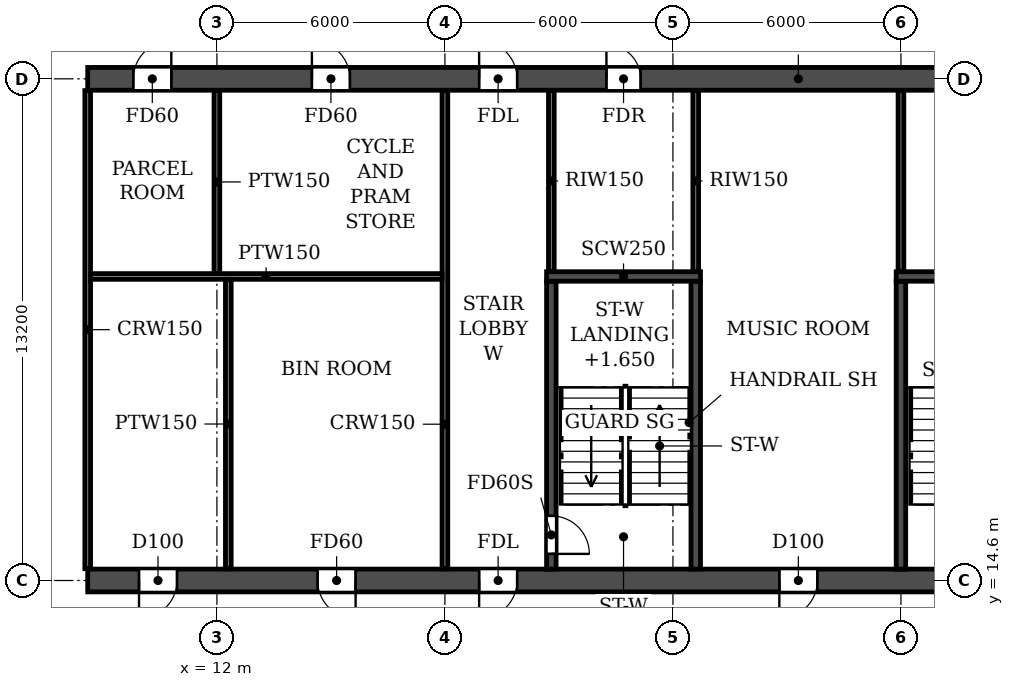
"""IFC4 building model, lengths in metres.
Left out: names, types, materials, properties, quantities, classifications, styles, units other than length and angle.
Written with IfcOpenShell. Run it as: python <this file> out.ifc"""

import sys

from ifc_helpers import new_model, si_unit, direction, frame, frame_2d, origin, place, context, subcontext, project, spatial, rectangle, extrude, element, fill, save


model = new_model("IFC4")
c1 = context("Model", 3, precision=1e-05, world=origin(), true_north=direction((0.0, 1.0)))
c2 = subcontext(c1, "Body", "Model", "MODEL_VIEW")
j1 = project(units=[si_unit("LENGTHUNIT", "METRE"), si_unit("PLANEANGLEUNIT", "RADIAN")], contexts=[c1])
p1 = place(None, origin())
s1 = spatial("IfcSite", under=j1, at=p1, CompositionType="ELEMENT")
p2 = place(p1, origin())
s2 = spatial("IfcBuilding", under=s1, at=p2, CompositionType="ELEMENT")
p3 = place(p2, frame((0.0, 0.0, 63.0)))
s3 = spatial("IfcBuildingStorey", under=s2, at=p3, CompositionType="ELEMENT", Elevation=63.0)
p4 = place(p3, frame((8.6, 14.6, 0.0), z_axis=(0.0, 0.0, 1.0), x_axis=(1.0, 0.0, 0.0)))
e1 = element("IfcWall", 1, at=p4, inside=s3, PredefinedType="SOLIDWALL", context=c2, shape_type="SweptSolid", body=[
    extrude(rectangle(XDim=84.8, YDim=0.6, at=frame_2d((42.4, 0.0))), origin(), (0.0, 0.0, 1.0), 2.95),
])
p5 = place(p4, frame((1.35, 0.0, 0.0)))
e2 = element("IfcOpeningElement", 2, at=p5, cuts=e1, PredefinedType="OPENING", context=c2, shape_type="SweptSolid", body=[
    extrude(rectangle(XDim=1.0, YDim=2.1, at=frame_2d((0.5, 1.05))), frame((0.0, 0.31, 0.0), z_axis=(0.0, -1.0, 0.0), x_axis=(1.0, 0.0, 0.0)), (0.0, 0.0, 1.0), 0.62),
])
p6 = place(p4, frame((6.05, 0.0, 0.0)))
e3 = element("IfcOpeningElement", 3, at=p6, cuts=e1, PredefinedType="OPENING", context=c2, shape_type="SweptSolid", body=[
    extrude(rectangle(XDim=1.0, YDim=2.1, at=frame_2d((0.5, 1.05))), frame((0.0, 0.31, 0.0), z_axis=(0.0, -1.0, 0.0), x_axis=(1.0, 0.0, 0.0)), (0.0, 0.0, 1.0), 0.62),
])
p7 = place(p4, frame((10.3, 0.0, 0.0)))
e4 = element("IfcOpeningElement", 4, at=p7, cuts=e1, PredefinedType="OPENING", context=c2, shape_type="SweptSolid", body=[
    extrude(rectangle(XDim=1.0, YDim=2.1, at=frame_2d((0.5, 1.05))), frame((0.0, 0.31, 0.0), z_axis=(0.0, -1.0, 0.0), x_axis=(1.0, 0.0, 0.0)), (0.0, 0.0, 1.0), 0.62),
])
p8 = place(p4, frame((18.2, 0.0, 0.0)))
e5 = element("IfcOpeningElement", 5, at=p8, cuts=e1, PredefinedType="OPENING", context=c2, shape_type="SweptSolid", body=[
    extrude(rectangle(XDim=1.0, YDim=2.1, at=frame_2d((0.5, 1.05))), frame((0.0, 0.31, 0.0), z_axis=(0.0, -1.0, 0.0), x_axis=(1.0, 0.0, 0.0)), (0.0, 0.0, 1.0), 0.62),
])
p9 = place(p4, frame((22.8, 0.0, 0.0)))
e6 = element("IfcOpeningElement", 6, at=p9, cuts=e1, PredefinedType="OPENING", context=c2, shape_type="SweptSolid", body=[
    extrude(rectangle(XDim=1.0, YDim=2.1, at=frame_2d((0.5, 1.05))), frame((0.0, 0.31, 0.0), z_axis=(0.0, -1.0, 0.0), x_axis=(1.0, 0.0, 0.0)), (0.0, 0.0, 1.0), 0.62),
])
p10 = place(p4, frame((35.4, 0.0, 0.0)))
e7 = element("IfcOpeningElement", 7, at=p10, cuts=e1, PredefinedType="OPENING", context=c2, shape_type="SweptSolid", body=[
    extrude(rectangle(XDim=1.0, YDim=2.1, at=frame_2d((0.5, 1.05))), frame((0.0, 0.31, 0.0), z_axis=(0.0, -1.0, 0.0), x_axis=(1.0, 0.0, 0.0)), (0.0, 0.0, 1.0), 0.62),
])
p11 = place(p4, frame((39.3, 0.0, 0.0)))
e8 = element("IfcOpeningElement", 8, at=p11, cuts=e1, PredefinedType="OPENING", context=c2, shape_type="SweptSolid", body=[
    extrude(rectangle(XDim=1.0, YDim=2.1, at=frame_2d((0.5, 1.05))), frame((0.0, 0.31, 0.0), z_axis=(0.0, -1.0, 0.0), x_axis=(1.0, 0.0, 0.0)), (0.0, 0.0, 1.0), 0.62),
])
p12 = place(p4, frame((41.9, 0.0, 0.0)))
e9 = element("IfcOpeningElement", 9, at=p12, cuts=e1, PredefinedType="OPENING", context=c2, shape_type="SweptSolid", body=[
    extrude(rectangle(XDim=1.0, YDim=2.1, at=frame_2d((0.5, 1.05))), frame((0.0, 0.31, 0.0), z_axis=(0.0, -1.0, 0.0), x_axis=(1.0, 0.0, 0.0)), (0.0, 0.0, 1.0), 0.62),
])
p13 = place(p4, frame((47.1, 0.0, 0.0)))
e10 = element("IfcOpeningElement", 10, at=p13, cuts=e1, PredefinedType="OPENING", context=c2, shape_type="SweptSolid", body=[
    extrude(rectangle(XDim=1.0, YDim=2.1, at=frame_2d((0.5, 1.05))), frame((0.0, 0.31, 0.0), z_axis=(0.0, -1.0, 0.0), x_axis=(1.0, 0.0, 0.0)), (0.0, 0.0, 1.0), 0.62),
])
p14 = place(p4, frame((61.0, 0.0, 0.0)))
e11 = element("IfcOpeningElement", 11, at=p14, cuts=e1, PredefinedType="OPENING", context=c2, shape_type="SweptSolid", body=[
    extrude(rectangle(XDim=1.0, YDim=2.1, at=frame_2d((0.5, 1.05))), frame((0.0, 0.31, 0.0), z_axis=(0.0, -1.0, 0.0), x_axis=(1.0, 0.0, 0.0)), (0.0, 0.0, 1.0), 0.62),
])
p15 = place(p4, frame((65.6, 0.0, 0.0)))
e12 = element("IfcOpeningElement", 12, at=p15, cuts=e1, PredefinedType="OPENING", context=c2, shape_type="SweptSolid", body=[
    extrude(rectangle(XDim=1.0, YDim=2.1, at=frame_2d((0.5, 1.05))), frame((0.0, 0.31, 0.0), z_axis=(0.0, -1.0, 0.0), x_axis=(1.0, 0.0, 0.0)), (0.0, 0.0, 1.0), 0.62),
])
p16 = place(p4, frame((73.5, 0.0, 0.0)))
e13 = element("IfcOpeningElement", 13, at=p16, cuts=e1, PredefinedType="OPENING", context=c2, shape_type="SweptSolid", body=[
    extrude(rectangle(XDim=1.0, YDim=2.1, at=frame_2d((0.5, 1.05))), frame((0.0, 0.31, 0.0), z_axis=(0.0, -1.0, 0.0), x_axis=(1.0, 0.0, 0.0)), (0.0, 0.0, 1.0), 0.62),
])
p17 = place(p4, frame((77.9, 0.0, 0.0)))
e14 = element("IfcOpeningElement", 14, at=p17, cuts=e1, PredefinedType="OPENING", context=c2, shape_type="SweptSolid", body=[
    extrude(rectangle(XDim=1.0, YDim=2.1, at=frame_2d((0.5, 1.05))), frame((0.0, 0.31, 0.0), z_axis=(0.0, -1.0, 0.0), x_axis=(1.0, 0.0, 0.0)), (0.0, 0.0, 1.0), 0.62),
])
p18 = place(p4, frame((82.6, 0.0, 0.0)))
e15 = element("IfcOpeningElement", 15, at=p18, cuts=e1, PredefinedType="OPENING", context=c2, shape_type="SweptSolid", body=[
    extrude(rectangle(XDim=1.0, YDim=2.1, at=frame_2d((0.5, 1.05))), frame((0.0, 0.31, 0.0), z_axis=(0.0, -1.0, 0.0), x_axis=(1.0, 0.0, 0.0)), (0.0, 0.0, 1.0), 0.62),
])
p19 = place(p3, frame((8.6, 27.8, 0.0), z_axis=(0.0, 0.0, 1.0), x_axis=(1.0, 0.0, 0.0)))
e16 = element("IfcWall", 16, at=p19, inside=s3, PredefinedType="SOLIDWALL", context=c2, shape_type="SweptSolid", body=[
    extrude(rectangle(XDim=84.8, YDim=0.6, at=frame_2d((42.4, 0.0))), origin(), (0.0, 0.0, 1.0), 2.95),
])
p20 = place(p19, frame((1.2, 0.0, 0.0)))
e17 = element("IfcOpeningElement", 17, at=p20, cuts=e16, PredefinedType="OPENING", context=c2, shape_type="SweptSolid", body=[
    extrude(rectangle(XDim=1.0, YDim=2.1, at=frame_2d((0.5, 1.05))), frame((0.0, 0.31, 0.0), z_axis=(0.0, -1.0, 0.0), x_axis=(1.0, 0.0, 0.0)), (0.0, 0.0, 1.0), 0.62),
])
p21 = place(p19, frame((5.9, 0.0, 0.0)))
e18 = element("IfcOpeningElement", 18, at=p21, cuts=e16, PredefinedType="OPENING", context=c2, shape_type="SweptSolid", body=[
    extrude(rectangle(XDim=1.0, YDim=2.1, at=frame_2d((0.5, 1.05))), frame((0.0, 0.31, 0.0), z_axis=(0.0, -1.0, 0.0), x_axis=(1.0, 0.0, 0.0)), (0.0, 0.0, 1.0), 0.62),
])
p22 = place(p19, frame((10.3, 0.0, 0.0)))
e19 = element("IfcOpeningElement", 19, at=p22, cuts=e16, PredefinedType="OPENING", context=c2, shape_type="SweptSolid", body=[
    extrude(rectangle(XDim=1.0, YDim=2.1, at=frame_2d((0.5, 1.05))), frame((0.0, 0.31, 0.0), z_axis=(0.0, -1.0, 0.0), x_axis=(1.0, 0.0, 0.0)), (0.0, 0.0, 1.0), 0.62),
])
p23 = place(p19, frame((13.65, 0.0, 0.0)))
e20 = element("IfcOpeningElement", 20, at=p23, cuts=e16, PredefinedType="OPENING", context=c2, shape_type="SweptSolid", body=[
    extrude(rectangle(XDim=0.9, YDim=2.1, at=frame_2d((0.45, 1.05))), frame((0.0, 0.31, 0.0), z_axis=(0.0, -1.0, 0.0), x_axis=(1.0, 0.0, 0.0)), (0.0, 0.0, 1.0), 0.62),
])
p24 = place(p19, frame((22.85, 0.0, 0.0)))
e21 = element("IfcOpeningElement", 21, at=p24, cuts=e16, PredefinedType="OPENING", context=c2, shape_type="SweptSolid", body=[
    extrude(rectangle(XDim=0.9, YDim=2.1, at=frame_2d((0.45, 1.05))), frame((0.0, 0.31, 0.0), z_axis=(0.0, -1.0, 0.0), x_axis=(1.0, 0.0, 0.0)), (0.0, 0.0, 1.0), 0.62),
])
p25 = place(p19, frame((27.3, 0.0, 0.0)))
e22 = element("IfcOpeningElement", 22, at=p25, cuts=e16, PredefinedType="OPENING", context=c2, shape_type="SweptSolid", body=[
    extrude(rectangle(XDim=1.0, YDim=2.1, at=frame_2d((0.5, 1.05))), frame((0.0, 0.31, 0.0), z_axis=(0.0, -1.0, 0.0), x_axis=(1.0, 0.0, 0.0)), (0.0, 0.0, 1.0), 0.62),
])
p26 = place(p19, frame((32.5, 0.0, 0.0)))
e23 = element("IfcOpeningElement", 23, at=p26, cuts=e16, PredefinedType="OPENING", context=c2, shape_type="SweptSolid", body=[
    extrude(rectangle(XDim=1.0, YDim=2.1, at=frame_2d((0.5, 1.05))), frame((0.0, 0.31, 0.0), z_axis=(0.0, -1.0, 0.0), x_axis=(1.0, 0.0, 0.0)), (0.0, 0.0, 1.0), 0.62),
])
p27 = place(p19, frame((39.0, 0.0, 0.0)))
e24 = element("IfcOpeningElement", 24, at=p27, cuts=e16, PredefinedType="OPENING", context=c2, shape_type="SweptSolid", body=[
    extrude(rectangle(XDim=1.0, YDim=2.1, at=frame_2d((0.5, 1.05))), frame((0.0, 0.31, 0.0), z_axis=(0.0, -1.0, 0.0), x_axis=(1.0, 0.0, 0.0)), (0.0, 0.0, 1.0), 0.62),
])
p28 = place(p19, frame((41.9, 0.0, 0.0)))
e25 = element("IfcOpeningElement", 25, at=p28, cuts=e16, PredefinedType="OPENING", context=c2, shape_type="SweptSolid", body=[
    extrude(rectangle(XDim=1.0, YDim=2.1, at=frame_2d((0.5, 1.05))), frame((0.0, 0.31, 0.0), z_axis=(0.0, -1.0, 0.0), x_axis=(1.0, 0.0, 0.0)), (0.0, 0.0, 1.0), 0.62),
])
p29 = place(p19, frame((47.4, 0.0, 0.0)))
e26 = element("IfcOpeningElement", 26, at=p29, cuts=e16, PredefinedType="OPENING", context=c2, shape_type="SweptSolid", body=[
    extrude(rectangle(XDim=1.0, YDim=2.1, at=frame_2d((0.5, 1.05))), frame((0.0, 0.31, 0.0), z_axis=(0.0, -1.0, 0.0), x_axis=(1.0, 0.0, 0.0)), (0.0, 0.0, 1.0), 0.62),
])
p30 = place(p19, frame((53.9, 0.0, 0.0)))
e27 = element("IfcOpeningElement", 27, at=p30, cuts=e16, PredefinedType="OPENING", context=c2, shape_type="SweptSolid", body=[
    extrude(rectangle(XDim=1.0, YDim=2.1, at=frame_2d((0.5, 1.05))), frame((0.0, 0.31, 0.0), z_axis=(0.0, -1.0, 0.0), x_axis=(1.0, 0.0, 0.0)), (0.0, 0.0, 1.0), 0.62),
])
p31 = place(p19, frame((57.8, 0.0, 0.0)))
e28 = element("IfcOpeningElement", 28, at=p31, cuts=e16, PredefinedType="OPENING", context=c2, shape_type="SweptSolid", body=[
    extrude(rectangle(XDim=1.0, YDim=2.1, at=frame_2d((0.5, 1.05))), frame((0.0, 0.31, 0.0), z_axis=(0.0, -1.0, 0.0), x_axis=(1.0, 0.0, 0.0)), (0.0, 0.0, 1.0), 0.62),
])
p32 = place(p19, frame((61.05, 0.0, 0.0)))
e29 = element("IfcOpeningElement", 29, at=p32, cuts=e16, PredefinedType="OPENING", context=c2, shape_type="SweptSolid", body=[
    extrude(rectangle(XDim=0.9, YDim=2.1, at=frame_2d((0.45, 1.05))), frame((0.0, 0.31, 0.0), z_axis=(0.0, -1.0, 0.0), x_axis=(1.0, 0.0, 0.0)), (0.0, 0.0, 1.0), 0.62),
])
p33 = place(p19, frame((70.25, 0.0, 0.0)))
e30 = element("IfcOpeningElement", 30, at=p33, cuts=e16, PredefinedType="OPENING", context=c2, shape_type="SweptSolid", body=[
    extrude(rectangle(XDim=0.9, YDim=2.1, at=frame_2d((0.45, 1.05))), frame((0.0, 0.31, 0.0), z_axis=(0.0, -1.0, 0.0), x_axis=(1.0, 0.0, 0.0)), (0.0, 0.0, 1.0), 0.62),
])
p34 = place(p19, frame((73.5, 0.0, 0.0)))
e31 = element("IfcOpeningElement", 31, at=p34, cuts=e16, PredefinedType="OPENING", context=c2, shape_type="SweptSolid", body=[
    extrude(rectangle(XDim=1.0, YDim=2.1, at=frame_2d((0.5, 1.05))), frame((0.0, 0.31, 0.0), z_axis=(0.0, -1.0, 0.0), x_axis=(1.0, 0.0, 0.0)), (0.0, 0.0, 1.0), 0.62),
])
p35 = place(p19, frame((77.75, 0.0, 0.0)))
e32 = element("IfcOpeningElement", 32, at=p35, cuts=e16, PredefinedType="OPENING", context=c2, shape_type="SweptSolid", body=[
    extrude(rectangle(XDim=1.0, YDim=2.1, at=frame_2d((0.5, 1.05))), frame((0.0, 0.31, 0.0), z_axis=(0.0, -1.0, 0.0), x_axis=(1.0, 0.0, 0.0)), (0.0, 0.0, 1.0), 0.62),
])
p36 = place(p19, frame((82.45, 0.0, 0.0)))
e33 = element("IfcOpeningElement", 33, at=p36, cuts=e16, PredefinedType="OPENING", context=c2, shape_type="SweptSolid", body=[
    extrude(rectangle(XDim=1.0, YDim=2.1, at=frame_2d((0.5, 1.05))), frame((0.0, 0.31, 0.0), z_axis=(0.0, -1.0, 0.0), x_axis=(1.0, 0.0, 0.0)), (0.0, 0.0, 1.0), 0.62),
])
p37 = place(p3, frame((30.0, 14.9, 0.0), z_axis=(0.0, 0.0, 1.0), x_axis=(0.0, 1.0, 0.0)))
e34 = element("IfcWall", 34, at=p37, inside=s3, PredefinedType="SOLIDWALL", context=c2, shape_type="SweptSolid", body=[
    extrude(rectangle(XDim=7.575, YDim=0.25, at=frame_2d((3.788, 0.0))), origin(), (0.0, 0.0, 1.0), 2.95),
])
p38 = place(p3, frame((29.875, 22.6, 0.0), z_axis=(0.0, 0.0, 1.0), x_axis=(1.0, 0.0, 0.0)))
e35 = element("IfcWall", 35, at=p38, inside=s3, PredefinedType="SOLIDWALL", context=c2, shape_type="SweptSolid", body=[
    extrude(rectangle(XDim=4.05, YDim=0.25, at=frame_2d((2.025, 0.0))), origin(), (0.0, 0.0, 1.0), 2.95),
])
p39 = place(p3, frame((20.8, 14.9, 0.0), z_axis=(0.0, 0.0, 1.0), x_axis=(0.0, 1.0, 0.0)))
e36 = element("IfcWall", 36, at=p39, inside=s3, PredefinedType="SOLIDWALL", context=c2, shape_type="SweptSolid", body=[
    extrude(rectangle(XDim=7.575, YDim=0.25, at=frame_2d((3.788, 0.0))), origin(), (0.0, 0.0, 1.0), 2.95),
])
p40 = place(p39, frame((0.4, 0.0, 0.0)))
e37 = element("IfcOpeningElement", 37, at=p40, cuts=e36, PredefinedType="OPENING", context=c2, shape_type="SweptSolid", body=[
    extrude(rectangle(XDim=1.0, YDim=2.1, at=frame_2d((0.5, 1.05))), frame((0.0, 0.135, 0.0), z_axis=(0.0, -1.0, 0.0), x_axis=(1.0, 0.0, 0.0)), (0.0, 0.0, 1.0), 0.27),
])
p41 = place(p3, frame((24.6, 14.9, 0.0), z_axis=(0.0, 0.0, 1.0), x_axis=(0.0, 1.0, 0.0)))
e38 = element("IfcWall", 38, at=p41, inside=s3, PredefinedType="SOLIDWALL", context=c2, shape_type="SweptSolid", body=[
    extrude(rectangle(XDim=7.575, YDim=0.25, at=frame_2d((3.788, 0.0))), origin(), (0.0, 0.0, 1.0), 2.95),
])
p42 = place(p3, frame((20.675, 22.6, 0.0), z_axis=(0.0, 0.0, 1.0), x_axis=(1.0, 0.0, 0.0)))
e39 = element("IfcWall", 39, at=p42, inside=s3, PredefinedType="SOLIDWALL", context=c2, shape_type="SweptSolid", body=[
    extrude(rectangle(XDim=4.05, YDim=0.25, at=frame_2d((2.025, 0.0))), origin(), (0.0, 0.0, 1.0), 2.95),
])
for number, where, z_axis, x_axis in (
    (40, (8.6, 14.91, 0.0), (0.0, 0.0, 1.0), (0.0, 1.0, 0.0)),
    (41, (18.0, 14.91, 0.0), (0.0, 0.0, 1.0), (0.0, 1.0, 0.0)),
):
    element("IfcWall", number, at=place(p3, frame(where, z_axis=z_axis, x_axis=x_axis)), inside=s3, PredefinedType="PARTITIONING", context=c2, shape_type="SweptSolid", body=[
        extrude(rectangle(XDim=12.58, YDim=0.15, at=frame_2d((6.29, 0.0))), origin(), (0.0, 0.0, 1.0), 2.95),
    ])
p43 = place(p3, frame((8.675, 22.6, 0.0), z_axis=(0.0, 0.0, 1.0), x_axis=(1.0, 0.0, 0.0)))
e42 = element("IfcWall", 42, at=p43, inside=s3, PredefinedType="PARTITIONING", context=c2, shape_type="SweptSolid", body=[
    extrude(rectangle(XDim=9.25, YDim=0.15, at=frame_2d((4.625, 0.0))), origin(), (0.0, 0.0, 1.0), 2.95),
])
p44 = place(p3, frame((12.0, 22.675, 0.0), z_axis=(0.0, 0.0, 1.0), x_axis=(0.0, 1.0, 0.0)))
e43 = element("IfcWall", 43, at=p44, inside=s3, PredefinedType="PARTITIONING", context=c2, shape_type="SweptSolid", body=[
    extrude(rectangle(XDim=4.815, YDim=0.15, at=frame_2d((2.407, 0.0))), origin(), (0.0, 0.0, 1.0), 2.95),
])
p45 = place(p3, frame((12.3, 14.91, 0.0), z_axis=(0.0, 0.0, 1.0), x_axis=(0.0, 1.0, 0.0)))
e44 = element("IfcWall", 44, at=p45, inside=s3, PredefinedType="PARTITIONING", context=c2, shape_type="SweptSolid", body=[
    extrude(rectangle(XDim=7.615, YDim=0.15, at=frame_2d((3.808, 0.0))), origin(), (0.0, 0.0, 1.0), 2.95),
])
for number, where, z_axis, x_axis in (
    (45, (20.8, 22.735, 0.0), (0.0, 0.0, 1.0), (0.0, 1.0, 0.0)),
    (46, (24.6, 22.735, 0.0), (0.0, 0.0, 1.0), (0.0, 1.0, 0.0)),
    (47, (30.0, 22.735, 0.0), (0.0, 0.0, 1.0), (0.0, 1.0, 0.0)),
):
    element("IfcWall", number, at=place(p3, frame(where, z_axis=z_axis, x_axis=x_axis)), inside=s3, PredefinedType="PARTITIONING", context=c2, shape_type="SweptSolid", body=[
        extrude(rectangle(XDim=4.755, YDim=0.15, at=frame_2d((2.377, 0.0))), origin(), (0.0, 0.0, 1.0), 2.95),
    ])
p46 = place(p20, origin())
e48 = element("IfcDoor", 48, at=p46, inside=s3, OperationType="SINGLE_SWING_RIGHT", PredefinedType="DOOR", context=c2, shape_type="SweptSolid", body=[
    extrude(rectangle(XDim=1.0, YDim=2.1, at=frame_2d((0.5, 1.05))), frame((0.0, 0.025, 0.0), z_axis=(0.0, -1.0, 0.0), x_axis=(1.0, 0.0, 0.0)), (0.0, 0.0, 1.0), 0.05),
])
fill(e17, e48)
p47 = place(p21, origin())
e49 = element("IfcDoor", 49, at=p47, inside=s3, OperationType="SINGLE_SWING_LEFT", PredefinedType="DOOR", context=c2, shape_type="SweptSolid", body=[
    extrude(rectangle(XDim=1.0, YDim=2.1, at=frame_2d((0.5, 1.05))), frame((0.0, 0.025, 0.0), z_axis=(0.0, -1.0, 0.0), x_axis=(1.0, 0.0, 0.0)), (0.0, 0.0, 1.0), 0.05),
])
fill(e18, e49)
p48 = place(p22, origin())
e50 = element("IfcDoor", 50, at=p48, inside=s3, OperationType="SINGLE_SWING_LEFT", PredefinedType="DOOR", context=c2, shape_type="SweptSolid", body=[
    extrude(rectangle(XDim=1.0, YDim=2.1, at=frame_2d((0.5, 1.05))), frame((0.0, 0.025, 0.0), z_axis=(0.0, -1.0, 0.0), x_axis=(1.0, 0.0, 0.0)), (0.0, 0.0, 1.0), 0.05),
])
fill(e19, e50)
p49 = place(p23, origin())
e51 = element("IfcDoor", 51, at=p49, inside=s3, OperationType="SINGLE_SWING_LEFT", PredefinedType="DOOR", context=c2, shape_type="SweptSolid", body=[
    extrude(rectangle(XDim=0.9, YDim=2.1, at=frame_2d((0.45, 1.05))), frame((0.0, 0.025, 0.0), z_axis=(0.0, -1.0, 0.0), x_axis=(1.0, 0.0, 0.0)), (0.0, 0.0, 1.0), 0.05),
])
fill(e20, e51)
p50 = place(p5, frame((1.0, 0.0, 0.0), z_axis=(0.0, 0.0, 1.0), x_axis=(-1.0, 0.0, 0.0)))
e52 = element("IfcDoor", 52, at=p50, inside=s3, OperationType="SINGLE_SWING_RIGHT", PredefinedType="DOOR", context=c2, shape_type="SweptSolid", body=[
    extrude(rectangle(XDim=1.0, YDim=2.1, at=frame_2d((0.5, 1.05))), frame((0.0, 0.025, 0.0), z_axis=(0.0, -1.0, 0.0), x_axis=(1.0, 0.0, 0.0)), (0.0, 0.0, 1.0), 0.05),
])
fill(e2, e52)
p51 = place(p6, frame((1.0, 0.0, 0.0), z_axis=(0.0, 0.0, 1.0), x_axis=(-1.0, 0.0, 0.0)))
e53 = element("IfcDoor", 53, at=p51, inside=s3, OperationType="SINGLE_SWING_LEFT", PredefinedType="DOOR", context=c2, shape_type="SweptSolid", body=[
    extrude(rectangle(XDim=1.0, YDim=2.1, at=frame_2d((0.5, 1.05))), frame((0.0, 0.025, 0.0), z_axis=(0.0, -1.0, 0.0), x_axis=(1.0, 0.0, 0.0)), (0.0, 0.0, 1.0), 0.05),
])
fill(e3, e53)
p52 = place(p7, frame((1.0, 0.0, 0.0), z_axis=(0.0, 0.0, 1.0), x_axis=(-1.0, 0.0, 0.0)))
e54 = element("IfcDoor", 54, at=p52, inside=s3, OperationType="SINGLE_SWING_RIGHT", PredefinedType="DOOR", context=c2, shape_type="SweptSolid", body=[
    extrude(rectangle(XDim=1.0, YDim=2.1, at=frame_2d((0.5, 1.05))), frame((0.0, 0.025, 0.0), z_axis=(0.0, -1.0, 0.0), x_axis=(1.0, 0.0, 0.0)), (0.0, 0.0, 1.0), 0.05),
])
fill(e4, e54)
p53 = place(p8, frame((1.0, 0.0, 0.0), z_axis=(0.0, 0.0, 1.0), x_axis=(-1.0, 0.0, 0.0)))
e55 = element("IfcDoor", 55, at=p53, inside=s3, OperationType="SINGLE_SWING_RIGHT", PredefinedType="DOOR", context=c2, shape_type="SweptSolid", body=[
    extrude(rectangle(XDim=1.0, YDim=2.1, at=frame_2d((0.5, 1.05))), frame((0.0, 0.025, 0.0), z_axis=(0.0, -1.0, 0.0), x_axis=(1.0, 0.0, 0.0)), (0.0, 0.0, 1.0), 0.05),
])
fill(e5, e55)
p54 = place(p40, frame((1.0, 0.0, 0.0), z_axis=(0.0, 0.0, 1.0), x_axis=(-1.0, 0.0, 0.0)))
e56 = element("IfcDoor", 56, at=p54, inside=s3, OperationType="SINGLE_SWING_RIGHT", PredefinedType="DOOR", context=c2, shape_type="SweptSolid", body=[
    extrude(rectangle(XDim=1.0, YDim=2.1, at=frame_2d((0.5, 1.05))), frame((0.0, 0.025, 0.0), z_axis=(0.0, -1.0, 0.0), x_axis=(1.0, 0.0, 0.0)), (0.0, 0.0, 1.0), 0.05),
])
fill(e37, e56)
save(model, sys.argv[1])
